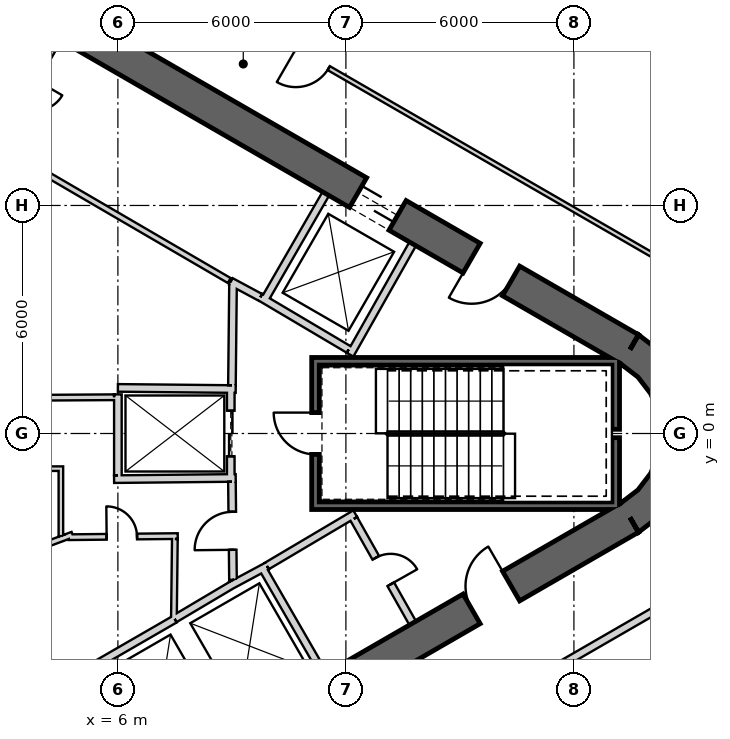
"""IFC4 building model, lengths in metres.
Left out: names, types, materials, properties, quantities, classifications, styles, units other than length and angle.
Written with IfcOpenShell. Run it as: python <this file> out.ifc"""

import sys

from ifc_helpers import new_model, si_unit, direction, frame, frame_2d, origin, place, context, subcontext, project, spatial, polyline, rectangle, outline, extrude, element, fill, save


model = new_model("IFC4")
c1 = context("Model", 3, precision=1e-05, world=origin(), true_north=direction((0.0, 1.0)))
c2 = subcontext(c1, "Body", "Model", "MODEL_VIEW")
j1 = project(units=[si_unit("LENGTHUNIT", "METRE"), si_unit("PLANEANGLEUNIT", "RADIAN")], contexts=[c1])
p1 = place(None, origin())
s1 = spatial("IfcSite", under=j1, at=p1, CompositionType="ELEMENT")
p2 = place(p1, origin())
s2 = spatial("IfcBuilding", under=s1, at=p2, CompositionType="ELEMENT")
p3 = place(p2, frame((0.0, 0.0, 357.2)))
s3 = spatial("IfcBuildingStorey", under=s2, at=p3, CompositionType="ELEMENT", Elevation=357.2)
p4 = place(p3, frame((19.475, 2.208, 0.0), z_axis=(0.0, 0.0, 1.0), x_axis=(-0.866028369851, 0.499994862586, 0.0)))
e1 = element("IfcWall", 1, at=p4, inside=s3, PredefinedType="SHEAR", context=c2, shape_type="SweptSolid", body=[
    extrude(rectangle(XDim=31.523, YDim=0.9, at=frame_2d((15.762, 0.0))), origin(), (0.0, 0.0, 1.0), 3.9),
])
p5 = place(p4, frame((7.062, 0.0, 0.0)))
e2 = element("IfcOpeningElement", 2, at=p5, cuts=e1, PredefinedType="OPENING", context=c2, shape_type="SweptSolid", body=[
    extrude(rectangle(XDim=1.2, YDim=2.4, at=frame_2d((0.6, 1.2))), frame((0.0, 0.46, 0.0), z_axis=(0.0, -1.0, 0.0), x_axis=(1.0, 0.0, 0.0)), (0.0, 0.0, 1.0), 0.92),
])
p6 = place(p4, frame((3.612, 0.0, 0.0)))
e3 = element("IfcOpeningElement", 3, at=p6, cuts=e1, PredefinedType="OPENING", context=c2, shape_type="SweptSolid", body=[
    extrude(rectangle(XDim=1.2, YDim=2.4, at=frame_2d((0.6, 1.2))), frame((0.0, 0.46, 0.0), z_axis=(0.0, -1.0, 0.0), x_axis=(1.0, 0.0, 0.0)), (0.0, 0.0, 1.0), 0.92),
])
p7 = place(p4, frame((26.712, 0.0, 0.0)))
e4 = element("IfcOpeningElement", 4, at=p7, cuts=e1, PredefinedType="OPENING", context=c2, shape_type="SweptSolid", body=[
    extrude(rectangle(XDim=1.2, YDim=2.4, at=frame_2d((0.6, 1.2))), frame((0.0, 0.46, 0.0), z_axis=(0.0, -1.0, 0.0), x_axis=(1.0, 0.0, 0.0)), (0.0, 0.0, 1.0), 0.92),
])
p8 = place(p3, frame((-7.825, -17.97, 0.0), z_axis=(0.0, 0.0, 1.0), x_axis=(0.866028369851, 0.499994862586, 0.0)))
e5 = element("IfcWall", 5, at=p8, inside=s3, PredefinedType="SHEAR", context=c2, shape_type="SweptSolid", body=[
    extrude(rectangle(XDim=31.523, YDim=0.9, at=frame_2d((15.762, 0.0))), origin(), (0.0, 0.0, 1.0), 3.9),
])
p9 = place(p8, frame((17.862, 0.0, 0.0)))
e6 = element("IfcOpeningElement", 6, at=p9, cuts=e5, PredefinedType="OPENING", context=c2, shape_type="SweptSolid", body=[
    extrude(rectangle(XDim=1.2, YDim=2.4, at=frame_2d((0.6, 1.2))), frame((0.0, 0.46, 0.0), z_axis=(0.0, -1.0, 0.0), x_axis=(1.0, 0.0, 0.0)), (0.0, 0.0, 1.0), 0.92),
])
p10 = place(p8, frame((20.562, 0.0, 0.0)))
e7 = element("IfcOpeningElement", 7, at=p10, cuts=e5, PredefinedType="OPENING", context=c2, shape_type="SweptSolid", body=[
    extrude(rectangle(XDim=1.2, YDim=2.4, at=frame_2d((0.6, 1.2))), frame((0.0, 0.46, 0.0), z_axis=(0.0, -1.0, 0.0), x_axis=(1.0, 0.0, 0.0)), (0.0, 0.0, 1.0), 0.92),
])
p11 = place(p8, frame((26.712, 0.0, 0.0)))
e8 = element("IfcOpeningElement", 8, at=p11, cuts=e5, PredefinedType="OPENING", context=c2, shape_type="SweptSolid", body=[
    extrude(rectangle(XDim=1.2, YDim=2.4, at=frame_2d((0.6, 1.2))), frame((0.0, 0.46, 0.0), z_axis=(0.0, -1.0, 0.0), x_axis=(1.0, 0.0, 0.0)), (0.0, 0.0, 1.0), 0.92),
])
p12 = place(p8, frame((3.612, 0.0, 0.0)))
e9 = element("IfcOpeningElement", 9, at=p12, cuts=e5, PredefinedType="OPENING", context=c2, shape_type="SweptSolid", body=[
    extrude(rectangle(XDim=1.2, YDim=2.4, at=frame_2d((0.6, 1.2))), frame((0.0, 0.46, 0.0), z_axis=(0.0, -1.0, 0.0), x_axis=(1.0, 0.0, 0.0)), (0.0, 0.0, 1.0), 0.92),
])
p13 = place(p3, origin())
e10 = element("IfcWall", 10, at=p13, inside=s3, PredefinedType="SHEAR", context=c2, shape_type="SweptSolid", body=[
    extrude(outline(polyline([(19.7, -2.598), (20.321, -2.121), (20.798, -1.5), (21.098, -0.777), (21.2, 0.0), (21.098, 0.777), (20.798, 1.5), (20.321, 2.121), (19.7, 2.598), (19.25, 1.819), (19.685, 1.485), (20.019, 1.05), (20.229, 0.543), (20.3, 0.0), (20.229, -0.543), (20.019, -1.05), (19.685, -1.485), (19.25, -1.819), (19.7, -2.598)])), origin(), (0.0, 0.0, 1.0), 3.9),
])
p14 = place(p3, frame((9.847, 3.495, 0.0), z_axis=(0.0, 0.0, 1.0), x_axis=(0.499984717929, 0.866034226713, 0.0)))
e11 = element("IfcWall", 11, at=p14, inside=s3, PredefinedType="PLUMBINGWALL", context=c2, shape_type="SweptSolid", body=[
    extrude(rectangle(XDim=3.25, YDim=0.2, at=frame_2d((1.625, 0.0))), origin(), (0.0, 0.0, 1.0), 3.6),
])
p15 = place(p3, frame((12.11, 2.073, 0.0), z_axis=(0.0, 0.0, 1.0), x_axis=(0.49196600604, 0.870614408852, 0.0)))
e12 = element("IfcWall", 12, at=p15, inside=s3, PredefinedType="PLUMBINGWALL", context=c2, shape_type="SweptSolid", body=[
    extrude(rectangle(XDim=3.35, YDim=0.2, at=frame_2d((1.675, 0.0))), origin(), (0.0, 0.0, 1.0), 3.6),
])
p16 = place(p3, frame((12.073, 2.211, 0.0), z_axis=(0.0, 0.0, 1.0), x_axis=(-0.860414880418, 0.509594185166, 0.0)))
e13 = element("IfcWall", 13, at=p16, inside=s3, PredefinedType="PLUMBINGWALL", context=c2, shape_type="SweptSolid", body=[
    extrude(rectangle(XDim=2.7, YDim=0.2, at=frame_2d((1.35, 0.0))), origin(), (0.0, 0.0, 1.0), 3.6),
])
p17 = place(p3, frame((5.159, -6.236, 0.0), z_axis=(0.0, 0.0, 1.0), x_axis=(0.866036505625, 0.499980770555, 0.0)))
e14 = element("IfcWall", 14, at=p17, inside=s3, PredefinedType="PLUMBINGWALL", context=c2, shape_type="SweptSolid", body=[
    extrude(rectangle(XDim=2.7, YDim=0.2, at=frame_2d((1.35, 0.0))), origin(), (0.0, 0.0, 1.0), 3.6),
])
p18 = place(p3, frame((9.795, -3.525, 0.0), z_axis=(0.0, 0.0, 1.0), x_axis=(0.499984717929, -0.866034226713, 0.0)))
e15 = element("IfcWall", 15, at=p18, inside=s3, PredefinedType="PLUMBINGWALL", context=c2, shape_type="SweptSolid", body=[
    extrude(rectangle(XDim=3.25, YDim=0.2, at=frame_2d((1.625, 0.0))), origin(), (0.0, 0.0, 1.0), 3.6),
])
p19 = place(p3, frame((8.974, -3.999, 0.0), z_axis=(0.0, 0.0, 1.0), x_axis=(0.880907015104, 0.473289373154, 0.0)))
e16 = element("IfcWall", 16, at=p19, inside=s3, PredefinedType="PLUMBINGWALL", context=c2, shape_type="SweptSolid", body=[
    extrude(rectangle(XDim=1.078, YDim=0.2, at=frame_2d((0.539, 0.0))), origin(), (0.0, 0.0, 1.0), 3.6),
])
p20 = place(p3, frame((7.493, -4.878, 0.0), z_axis=(0.0, 0.0, 1.0), x_axis=(0.859981807212, 0.510324691999, 0.0)))
e17 = element("IfcWall", 17, at=p20, inside=s3, PredefinedType="PLUMBINGWALL", context=c2, shape_type="SweptSolid", body=[
    extrude(rectangle(XDim=1.845, YDim=0.2, at=frame_2d((0.922, 0.0))), origin(), (0.0, 0.0, 1.0), 3.6),
])
p21 = place(p3, frame((19.2, 1.9, -0.3), z_axis=(0.0, 0.0, 1.0), x_axis=(-1.0, 0.0, 0.0)))
e18 = element("IfcWall", 18, at=p21, inside=s3, PredefinedType="SHEAR", context=c2, shape_type="SweptSolid", body=[
    extrude(rectangle(XDim=8.1, YDim=0.2, at=frame_2d((4.05, 0.0))), origin(), (0.0, 0.0, 1.0), 3.9),
])
p22 = place(p3, frame((19.1, -2.0, -0.3), z_axis=(0.0, 0.0, 1.0), x_axis=(0.0, 1.0, 0.0)))
e19 = element("IfcWall", 19, at=p22, inside=s3, PredefinedType="SHEAR", context=c2, shape_type="SweptSolid", body=[
    extrude(rectangle(XDim=3.8, YDim=0.2, at=frame_2d((1.9, 0.0))), origin(), (0.0, 0.0, 1.0), 3.9),
])
p23 = place(p3, frame((11.1, -1.9, -0.3), z_axis=(0.0, 0.0, 1.0), x_axis=(1.0, 0.0, 0.0)))
e20 = element("IfcWall", 20, at=p23, inside=s3, PredefinedType="SHEAR", context=c2, shape_type="SweptSolid", body=[
    extrude(rectangle(XDim=7.9, YDim=0.2, at=frame_2d((3.95, 0.0))), origin(), (0.0, 0.0, 1.0), 3.9),
])
p24 = place(p3, frame((11.2, -1.8, -0.3), z_axis=(0.0, 0.0, 1.0), x_axis=(0.0, 1.0, 0.0)))
e21 = element("IfcWall", 21, at=p24, inside=s3, PredefinedType="SHEAR", context=c2, shape_type="SweptSolid", body=[
    extrude(rectangle(XDim=3.6, YDim=0.2, at=frame_2d((1.8, 0.0))), origin(), (0.0, 0.0, 1.0), 3.9),
])
p25 = place(p24, frame((1.25, 0.0, 0.3)))
e22 = element("IfcOpeningElement", 22, at=p25, cuts=e21, PredefinedType="OPENING", context=c2, shape_type="SweptSolid", body=[
    extrude(rectangle(XDim=1.1, YDim=2.1, at=frame_2d((0.55, 1.05))), frame((0.0, 0.11, 0.0), z_axis=(0.0, -1.0, 0.0), x_axis=(1.0, 0.0, 0.0)), (0.0, 0.0, 1.0), 0.22),
])
p26 = place(p3, frame((8.97, 1.2, 0.0), z_axis=(0.0, 0.0, 1.0), x_axis=(0.0, -1.0, 0.0)))
e23 = element("IfcWall", 23, at=p26, inside=s3, PredefinedType="PLUMBINGWALL", context=c2, shape_type="SweptSolid", body=[
    extrude(rectangle(XDim=2.4, YDim=0.2, at=frame_2d((1.2, 0.0))), origin(), (0.0, 0.0, 1.0), 3.6),
])
p27 = place(p26, frame((0.6, 0.0, 0.0)))
e24 = element("IfcOpeningElement", 24, at=p27, cuts=e23, PredefinedType="OPENING", context=c2, shape_type="SweptSolid", body=[
    extrude(rectangle(XDim=1.2, YDim=2.4, at=frame_2d((0.6, 1.2))), frame((0.0, 0.11, 0.0), z_axis=(0.0, -1.0, 0.0), x_axis=(1.0, 0.0, 0.0)), (0.0, 0.0, 1.0), 0.22),
])
p28 = place(p3, frame((6.0, 1.2, 0.0), z_axis=(0.0, 0.0, 1.0), x_axis=(0.999949988, -0.010001074852, 0.0)))
e25 = element("IfcWall", 25, at=p28, inside=s3, PredefinedType="PLUMBINGWALL", context=c2, shape_type="SweptSolid", body=[
    extrude(rectangle(XDim=3.1, YDim=0.2, at=frame_2d((1.55, 0.0))), origin(), (0.0, 0.0, 1.0), 3.6),
])
p29 = place(p3, frame((5.9, -1.201, 0.0), z_axis=(0.0, 0.0, 1.0), x_axis=(0.999950064753, 0.009993397809, 0.0)))
e26 = element("IfcWall", 26, at=p29, inside=s3, PredefinedType="PLUMBINGWALL", context=c2, shape_type="SweptSolid", body=[
    extrude(rectangle(XDim=3.2, YDim=0.2, at=frame_2d((1.6, 0.0))), origin(), (0.0, 0.0, 1.0), 3.6),
])
p30 = place(p3, frame((6.0, -1.1, 0.0), z_axis=(0.0, 0.0, 1.0), x_axis=(0.0, 1.0, 0.0)))
e27 = element("IfcWall", 27, at=p30, inside=s3, PredefinedType="PLUMBINGWALL", context=c2, shape_type="SweptSolid", body=[
    extrude(rectangle(XDim=2.28, YDim=0.2, at=frame_2d((1.14, 0.0))), origin(), (0.0, 0.0, 1.0), 3.6),
])
p31 = place(p3, frame((5.17, 6.195, 0.0), z_axis=(0.0, 0.0, 1.0), x_axis=(0.499984717929, 0.866034226713, 0.0)))
e28 = element("IfcWall", 28, at=p31, inside=s3, PredefinedType="PARTITIONING", context=c2, shape_type="SweptSolid", body=[
    extrude(rectangle(XDim=3.25, YDim=0.12, at=frame_2d((1.625, 0.0))), origin(), (0.0, 0.0, 1.0), 3.6),
])
p32 = place(p31, frame((1.225, 0.0, 0.0)))
e29 = element("IfcOpeningElement", 29, at=p32, cuts=e28, PredefinedType="OPENING", context=c2, shape_type="SweptSolid", body=[
    extrude(rectangle(XDim=0.8, YDim=2.1, at=frame_2d((0.4, 1.05))), frame((0.0, 0.07, 0.0), z_axis=(0.0, -1.0, 0.0), x_axis=(1.0, 0.0, 0.0)), (0.0, 0.0, 1.0), 0.14),
])
p33 = place(p3, frame((8.974, 3.999, 0.0), z_axis=(0.0, 0.0, 1.0), x_axis=(0.880917147855, -0.473270513147, 0.0)))
e30 = element("IfcWall", 30, at=p33, inside=s3, PredefinedType="PARTITIONING", context=c2, shape_type="SweptSolid", body=[
    extrude(rectangle(XDim=0.878, YDim=0.2, at=frame_2d((0.439, 0.0))), origin(), (0.0, 0.0, 1.0), 3.6),
])
p34 = place(p3, frame((8.931, 4.025, 0.0), z_axis=(0.0, 0.0, 1.0), x_axis=(-0.862666884027, 0.505772525157, 0.0)))
e31 = element("IfcWall", 31, at=p34, inside=s3, PredefinedType="PLUMBINGWALL", context=c2, shape_type="SweptSolid", body=[
    extrude(rectangle(XDim=4.372, YDim=0.15, at=frame_2d((2.186, 0.0))), origin(), (0.0, 0.0, 1.0), 3.6),
])
p35 = place(p3, frame((5.159, 6.236, 0.0), z_axis=(0.0, 0.0, 1.0), x_axis=(-0.868105023632, 0.496380567654, 0.0)))
e32 = element("IfcWall", 32, at=p35, inside=s3, PredefinedType="PLUMBINGWALL", context=c2, shape_type="SweptSolid", body=[
    extrude(rectangle(XDim=7.072, YDim=0.15, at=frame_2d((3.536, 0.0))), origin(), (0.0, 0.0, 1.0), 3.6),
])
p36 = place(p3, frame((12.245, -2.109, 0.0), z_axis=(0.0, 0.0, 1.0), x_axis=(-0.860414880418, -0.509594185166, 0.0)))
e33 = element("IfcWall", 33, at=p36, inside=s3, PredefinedType="PARTITIONING", context=c2, shape_type="SweptSolid", body=[
    extrude(rectangle(XDim=2.7, YDim=0.2, at=frame_2d((1.35, 0.0))), origin(), (0.0, 0.0, 1.0), 3.6),
])
p37 = place(p3, frame((13.758, -4.99, 0.0), z_axis=(0.0, 0.0, 1.0), x_axis=(-0.491993409184, 0.87059892334, 0.0)))
e34 = element("IfcWall", 34, at=p37, inside=s3, PredefinedType="PARTITIONING", context=c2, shape_type="SweptSolid", body=[
    extrude(rectangle(XDim=3.15, YDim=0.2, at=frame_2d((1.575, 0.0))), origin(), (0.0, 0.0, 1.0), 3.6),
])
p38 = place(p37, frame((1.175, 0.0, 0.0)))
e35 = element("IfcOpeningElement", 35, at=p38, cuts=e34, PredefinedType="OPENING", context=c2, shape_type="SweptSolid", body=[
    extrude(rectangle(XDim=0.8, YDim=2.1, at=frame_2d((0.4, 1.05))), frame((0.0, 0.11, 0.0), z_axis=(0.0, -1.0, 0.0), x_axis=(1.0, 0.0, 0.0)), (0.0, 0.0, 1.0), 0.22),
])
p39 = place(p3, frame((9.001, 1.27, 0.0), z_axis=(0.0, 0.0, 1.0), x_axis=(0.01074821465, 0.999942236273, 0.0)))
e36 = element("IfcWall", 36, at=p39, inside=s3, PredefinedType="PARTITIONING", context=c2, shape_type="SweptSolid", body=[
    extrude(rectangle(XDim=2.726, YDim=0.2, at=frame_2d((1.363, 0.0))), origin(), (0.0, 0.0, 1.0), 3.6),
])
p40 = place(p3, frame((9.029, -3.851, 0.0), z_axis=(0.0, 0.0, 1.0), x_axis=(-0.010783593937, 0.99994185536, 0.0)))
e37 = element("IfcWall", 37, at=p40, inside=s3, PredefinedType="PARTITIONING", context=c2, shape_type="SweptSolid", body=[
    extrude(rectangle(XDim=2.581, YDim=0.2, at=frame_2d((1.291, 0.0))), origin(), (0.0, 0.0, 1.0), 3.6),
])
p41 = place(p40, frame((0.791, 0.0, 0.0)))
e38 = element("IfcOpeningElement", 38, at=p41, cuts=e37, PredefinedType="OPENING", context=c2, shape_type="SweptSolid", body=[
    extrude(rectangle(XDim=1.0, YDim=2.1, at=frame_2d((0.5, 1.05))), frame((0.0, 0.11, 0.0), z_axis=(0.0, -1.0, 0.0), x_axis=(1.0, 0.0, 0.0)), (0.0, 0.0, 1.0), 0.22),
])
p42 = place(p3, frame((1.388, 1.074, 0.0), z_axis=(0.0, 0.0, 1.0), x_axis=(0.99997856967, 0.006546770205, 0.0)))
e39 = element("IfcWall", 39, at=p42, inside=s3, PredefinedType="PLUMBINGWALL", context=c2, shape_type="SweptSolid", body=[
    extrude(rectangle(XDim=4.512, YDim=0.15, at=frame_2d((2.256, 0.0))), origin(), (0.0, 0.0, 1.0), 3.6),
])
p43 = place(p42, frame((1.92, 0.0, 0.0)))
e40 = element("IfcOpeningElement", 40, at=p43, cuts=e39, PredefinedType="OPENING", context=c2, shape_type="SweptSolid", body=[
    extrude(rectangle(XDim=0.8, YDim=2.1, at=frame_2d((0.4, 1.05))), frame((0.0, 0.085, 0.0), z_axis=(0.0, -1.0, 0.0), x_axis=(1.0, 0.0, 0.0)), (0.0, 0.0, 1.0), 0.17),
])
p44 = place(p3, frame((4.56, -1.075, 0.0), z_axis=(0.0, 0.0, 1.0), x_axis=(-1.0, 0.0, 0.0)))
e41 = element("IfcWall", 41, at=p44, inside=s3, PredefinedType="PARTITIONING", context=c2, shape_type="SweptSolid", body=[
    extrude(rectangle(XDim=3.026, YDim=0.12, at=frame_2d((1.513, 0.0))), origin(), (0.0, 0.0, 1.0), 3.6),
])
p45 = place(p3, frame((4.5, -2.76, 0.0), z_axis=(0.0, 0.0, 1.0), x_axis=(0.0, 1.0, 0.0)))
e42 = element("IfcWall", 42, at=p45, inside=s3, PredefinedType="PARTITIONING", context=c2, shape_type="SweptSolid", body=[
    extrude(rectangle(XDim=1.625, YDim=0.12, at=frame_2d((0.812, 0.0))), origin(), (0.0, 0.0, 1.0), 3.6),
])
p46 = place(p3, frame((7.56, -2.7, 0.0), z_axis=(0.0, 0.0, 1.0), x_axis=(-1.0, 0.0, 0.0)))
e43 = element("IfcWall", 43, at=p46, inside=s3, PredefinedType="PARTITIONING", context=c2, shape_type="SweptSolid", body=[
    extrude(rectangle(XDim=3.0, YDim=0.12, at=frame_2d((1.5, 0.0))), origin(), (0.0, 0.0, 1.0), 3.6),
])
p47 = place(p3, frame((7.475, -4.865, 0.0), z_axis=(0.0, 0.0, 1.0), x_axis=(0.011716133148, 0.999931363757, 0.0)))
e44 = element("IfcWall", 44, at=p47, inside=s3, PredefinedType="PARTITIONING", context=c2, shape_type="SweptSolid", body=[
    extrude(rectangle(XDim=2.105, YDim=0.12, at=frame_2d((1.052, 0.0))), origin(), (0.0, 0.0, 1.0), 3.6),
])
p48 = place(p3, frame((16.523, 8.358, 0.0), z_axis=(0.0, 0.0, 1.0), x_axis=(-0.866024307761, 0.500001898363, 0.0)))
e45 = element("IfcWall", 45, at=p48, inside=s3, PredefinedType="PARTITIONING", context=c2, shape_type="SweptSolid", body=[
    extrude(rectangle(XDim=16.865, YDim=0.2, at=frame_2d((8.432, 0.0))), origin(), (0.0, 0.0, 1.0), 3.07),
])
p49 = place(p48, frame((7.924, 0.0, 0.0)))
e46 = element("IfcOpeningElement", 46, at=p49, cuts=e45, PredefinedType="OPENING", context=c2, shape_type="SweptSolid", body=[
    extrude(rectangle(XDim=1.0, YDim=2.1, at=frame_2d((0.5, 1.05))), frame((0.0, 0.11, 0.0), z_axis=(0.0, -1.0, 0.0), x_axis=(1.0, 0.0, 0.0)), (0.0, 0.0, 1.0), 0.22),
])
p50 = place(p3, frame((22.04, 5.173, 0.0), z_axis=(0.0, 0.0, 1.0), x_axis=(-0.86601318911, 0.500021155841, 0.0)))
e47 = element("IfcWall", 47, at=p50, inside=s3, PredefinedType="PARTITIONING", context=c2, shape_type="SweptSolid", body=[
    extrude(rectangle(XDim=2.665, YDim=0.12, at=frame_2d((1.333, 0.0))), origin(), (0.0, 0.0, 1.0), 3.6),
])
p51 = place(p50, frame((0.933, 0.0, 0.0)))
e48 = element("IfcOpeningElement", 48, at=p51, cuts=e47, PredefinedType="OPENING", context=c2, shape_type="SweptSolid", body=[
    extrude(rectangle(XDim=0.9, YDim=2.1, at=frame_2d((0.45, 1.05))), frame((0.0, 0.07, 0.0), z_axis=(0.0, -1.0, 0.0), x_axis=(1.0, 0.0, 0.0)), (0.0, 0.0, 1.0), 0.14),
])
p52 = place(p3, frame((19.732, 6.505, 0.0), z_axis=(0.0, 0.0, 1.0), x_axis=(-0.866038098351, 0.49997801172, 0.0)))
e49 = element("IfcWall", 49, at=p52, inside=s3, PredefinedType="PARTITIONING", context=c2, shape_type="SweptSolid", body=[
    extrude(rectangle(XDim=3.666, YDim=0.12, at=frame_2d((1.833, 0.0))), origin(), (0.0, 0.0, 1.0), 2.97),
])
p53 = place(p52, frame((1.383, 0.0, 0.0)))
e50 = element("IfcOpeningElement", 50, at=p53, cuts=e49, PredefinedType="OPENING", context=c2, shape_type="SweptSolid", body=[
    extrude(rectangle(XDim=0.9, YDim=2.1, at=frame_2d((0.45, 1.05))), frame((0.0, 0.07, 0.0), z_axis=(0.0, -1.0, 0.0), x_axis=(1.0, 0.0, 0.0)), (0.0, 0.0, 1.0), 0.14),
])
p54 = place(p3, frame((13.691, -10.224, 0.0), z_axis=(0.0, 0.0, 1.0), x_axis=(0.866025593094, 0.499999672107, 0.0)))
e51 = element("IfcWall", 51, at=p54, inside=s3, PredefinedType="PARTITIONING", context=c2, shape_type="SweptSolid", body=[
    extrude(rectangle(XDim=9.631, YDim=0.2, at=frame_2d((4.815, 0.0))), origin(), (0.0, 0.0, 1.0), 2.97),
])
p55 = place(p54, frame((4.315, 0.0, 0.0)))
e52 = element("IfcOpeningElement", 52, at=p55, cuts=e51, PredefinedType="OPENING", context=c2, shape_type="SweptSolid", body=[
    extrude(rectangle(XDim=1.0, YDim=2.1, at=frame_2d((0.5, 1.05))), frame((0.0, 0.11, 0.0), z_axis=(0.0, -1.0, 0.0), x_axis=(1.0, 0.0, 0.0)), (0.0, 0.0, 1.0), 0.22),
])
p56 = place(p3, frame((18.39, 11.853, 0.0), z_axis=(0.0, 0.0, 1.0), x_axis=(0.866041454758, -0.499972197867, 0.0)))
e53 = element("IfcWall", 53, at=p56, inside=s3, PredefinedType="PARTITIONING", context=c2, shape_type="SweptSolid", body=[
    extrude(rectangle(XDim=3.836, YDim=0.2, at=frame_2d((1.918, 0.0))), origin(), (0.0, 0.0, 1.0), 3.6),
])
p57 = place(p3, frame((16.521, 8.475, 0.0), z_axis=(0.0, 0.0, 1.0), x_axis=(0.506577406318, 0.862194485837, 0.0)))
e54 = element("IfcWall", 54, at=p57, inside=s3, PredefinedType="PARTITIONING", context=c2, shape_type="SweptSolid", body=[
    extrude(rectangle(XDim=3.76, YDim=0.2, at=frame_2d((1.88, 0.0))), origin(), (0.0, 0.0, 1.0), 3.6),
])
p58 = place(p3, frame((19.762, 6.557, 0.0), z_axis=(0.0, 0.0, 1.0), x_axis=(0.500015340139, 0.86601654697, 0.0)))
e55 = element("IfcWall", 55, at=p58, inside=s3, PredefinedType="PARTITIONING", context=c2, shape_type="SweptSolid", body=[
    extrude(rectangle(XDim=3.8, YDim=0.12, at=frame_2d((1.9, 0.0))), origin(), (0.0, 0.0, 1.0), 2.97),
])
p59 = place(p25, origin())
e56 = element("IfcDoor", 56, at=p59, inside=s3, OperationType="SINGLE_SWING_RIGHT", PredefinedType="USERDEFINED", context=c2, shape_type="SweptSolid", body=[
    extrude(rectangle(XDim=1.1, YDim=2.1, at=frame_2d((0.55, 1.05))), frame((0.0, 0.025, 0.0), z_axis=(0.0, -1.0, 0.0), x_axis=(1.0, 0.0, 0.0)), (0.0, 0.0, 1.0), 0.05),
])
fill(e22, e56)
p60 = place(p41, origin())
e57 = element("IfcDoor", 57, at=p60, inside=s3, OperationType="SINGLE_SWING_LEFT", PredefinedType="USERDEFINED", context=c2, shape_type="SweptSolid", body=[
    extrude(rectangle(XDim=1.0, YDim=2.1, at=frame_2d((0.5, 1.05))), frame((0.0, 0.025, 0.0), z_axis=(0.0, -1.0, 0.0), x_axis=(1.0, 0.0, 0.0)), (0.0, 0.0, 1.0), 0.05),
])
fill(e38, e57)
p61 = place(p27, origin())
e58 = element("IfcDoor", 58, at=p61, inside=s3, OperationType="SLIDING_TO_LEFT", PredefinedType="USERDEFINED", context=c2, shape_type="SweptSolid", body=[
    extrude(rectangle(XDim=1.2, YDim=2.4, at=frame_2d((0.6, 1.2))), frame((0.0, 0.025, 0.0), z_axis=(0.0, -1.0, 0.0), x_axis=(1.0, 0.0, 0.0)), (0.0, 0.0, 1.0), 0.05),
])
fill(e24, e58)
p62 = place(p32, origin())
e59 = element("IfcDoor", 59, at=p62, inside=s3, OperationType="SINGLE_SWING_LEFT", PredefinedType="USERDEFINED", context=c2, shape_type="SweptSolid", body=[
    extrude(rectangle(XDim=0.8, YDim=2.1, at=frame_2d((0.4, 1.05))), frame((0.0, 0.025, 0.0), z_axis=(0.0, -1.0, 0.0), x_axis=(1.0, 0.0, 0.0)), (0.0, 0.0, 1.0), 0.05),
])
fill(e29, e59)
p63 = place(p38, origin())
e60 = element("IfcDoor", 60, at=p63, inside=s3, OperationType="SINGLE_SWING_LEFT", PredefinedType="USERDEFINED", context=c2, shape_type="SweptSolid", body=[
    extrude(rectangle(XDim=0.8, YDim=2.1, at=frame_2d((0.4, 1.05))), frame((0.0, 0.025, 0.0), z_axis=(0.0, -1.0, 0.0), x_axis=(1.0, 0.0, 0.0)), (0.0, 0.0, 1.0), 0.05),
])
fill(e35, e60)
p64 = place(p53, origin())
e61 = element("IfcDoor", 61, at=p64, inside=s3, OperationType="SINGLE_SWING_RIGHT", PredefinedType="NOTDEFINED", context=c2, shape_type="SweptSolid", body=[
    extrude(rectangle(XDim=0.9, YDim=2.1, at=frame_2d((0.45, 1.05))), frame((0.0, 0.025, 0.0), z_axis=(0.0, -1.0, 0.0), x_axis=(1.0, 0.0, 0.0)), (0.0, 0.0, 1.0), 0.05),
])
fill(e50, e61)
p65 = place(p5, origin())
e62 = element("IfcDoor", 62, at=p65, inside=s3, OperationType="SLIDING_TO_LEFT", PredefinedType="USERDEFINED", context=c2, shape_type="SweptSolid", body=[
    extrude(rectangle(XDim=1.2, YDim=2.4, at=frame_2d((0.6, 1.2))), frame((0.0, 0.025, 0.0), z_axis=(0.0, -1.0, 0.0), x_axis=(1.0, 0.0, 0.0)), (0.0, 0.0, 1.0), 0.05),
])
fill(e2, e62)
p66 = place(p11, origin())
e63 = element("IfcDoor", 63, at=p66, inside=s3, OperationType="SINGLE_SWING_RIGHT", PredefinedType="USERDEFINED", context=c2, shape_type="SweptSolid", body=[
    extrude(rectangle(XDim=1.2, YDim=2.4, at=frame_2d((0.6, 1.2))), frame((0.0, 0.025, 0.0), z_axis=(0.0, -1.0, 0.0), x_axis=(1.0, 0.0, 0.0)), (0.0, 0.0, 1.0), 0.05),
])
fill(e8, e63)
p67 = place(p6, origin())
e64 = element("IfcDoor", 64, at=p67, inside=s3, OperationType="SINGLE_SWING_LEFT", PredefinedType="USERDEFINED", context=c2, shape_type="SweptSolid", body=[
    extrude(rectangle(XDim=1.2, YDim=2.4, at=frame_2d((0.6, 1.2))), frame((0.0, 0.025, 0.0), z_axis=(0.0, -1.0, 0.0), x_axis=(1.0, 0.0, 0.0)), (0.0, 0.0, 1.0), 0.05),
])
fill(e3, e64)
save(model, sys.argv[1])
